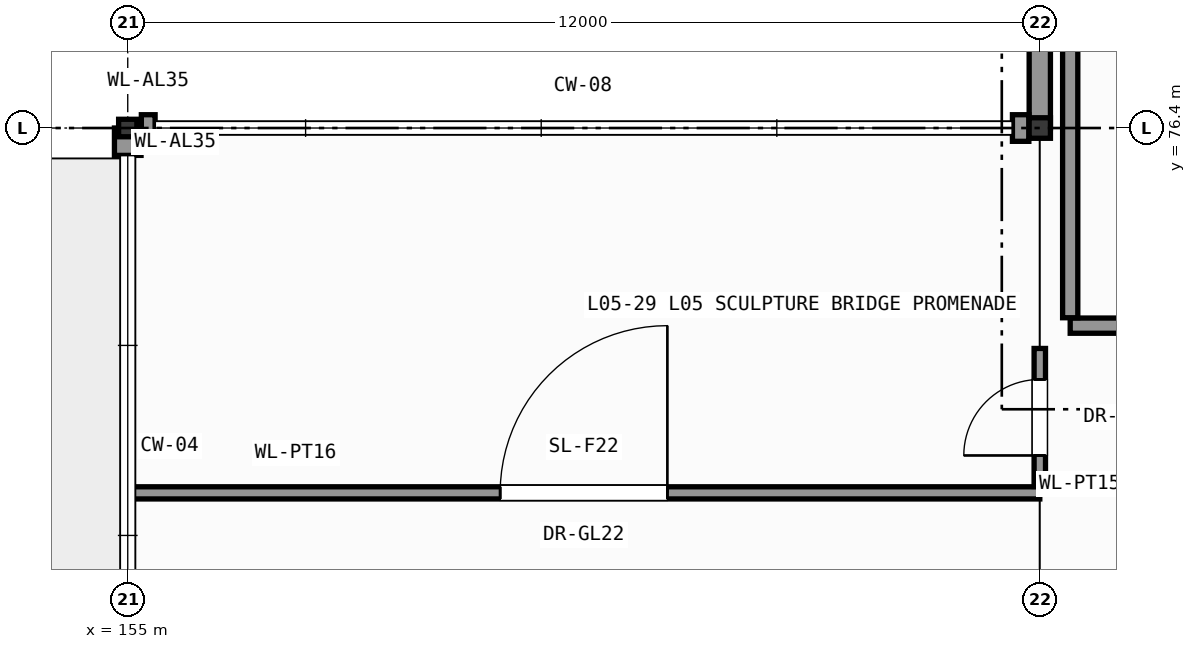
"""IFC4 building model, lengths in metres.
Left out: names, types, materials, properties, quantities, classifications, styles, units other than length and angle.
Written with IfcOpenShell. Run it as: python <this file> out.ifc"""

import sys

from ifc_helpers import new_model, si_unit, direction, frame, frame_2d, origin, origin_2d, place, context, subcontext, project, spatial, rectangle, i_section, extrude, element, fill, save


model = new_model("IFC4")
c1 = context("Model", 3, precision=1e-05, world=origin(), true_north=direction((0.0, 1.0)))
c2 = subcontext(c1, "Body", "Model", "MODEL_VIEW")
j1 = project(units=[si_unit("LENGTHUNIT", "METRE"), si_unit("PLANEANGLEUNIT", "RADIAN")], contexts=[c1])
p1 = place(None, origin())
s1 = spatial("IfcSite", under=j1, at=p1, CompositionType="ELEMENT")
p2 = place(p1, origin())
s2 = spatial("IfcBuilding", under=s1, at=p2, CompositionType="ELEMENT")
p3 = place(p2, frame((0.0, 0.0, 22.2)))
s3 = spatial("IfcBuildingStorey", under=s2, at=p3, CompositionType="ELEMENT", Elevation=22.2)
p4 = place(p3, frame((155.0, 76.4, 0.0), z_axis=(0.0, 0.0, 1.0), x_axis=(1.0, 0.0, 0.0)))
e1 = element("IfcColumn", 1, at=p4, inside=s3, PredefinedType="COLUMN", context=c2, shape_type="SweptSolid", body=[
    extrude(i_section(OverallWidth=0.24, OverallDepth=0.23, WebThickness=0.008, FlangeThickness=0.012, FilletRadius=0.021, at=origin_2d()), origin(), (0.0, 0.0, 1.0), 4.2),
])
p5 = place(p3, frame((167.0, 76.4, 0.0), z_axis=(0.0, 0.0, 1.0), x_axis=(1.0, 0.0, 0.0)))
e2 = element("IfcColumn", 2, at=p5, inside=s3, PredefinedType="COLUMN", context=c2, shape_type="SweptSolid", body=[
    extrude(i_section(OverallWidth=0.28, OverallDepth=0.27, WebThickness=0.008, FlangeThickness=0.013, FilletRadius=0.024, at=origin_2d()), origin(), (0.0, 0.0, 1.0), 4.2),
])
p6 = place(p3, frame((155.0, 76.4, 0.0), z_axis=(0.0, 0.0, 1.0), x_axis=(0.0, -1.0, 0.0)))
e3 = element("IfcWall", 3, at=p6, inside=s3, PredefinedType="SOLIDWALL", context=c2, shape_type="SweptSolid", body=[
    extrude(rectangle(XDim=0.36, YDim=0.35, at=frame_2d((0.18, 0.0))), origin(), (0.0, 0.0, 1.0), 3.485),
])
p7 = place(p3, frame((167.0, 76.4, 0.0), z_axis=(0.0, 0.0, 1.0), x_axis=(0.0, 1.0, 0.0)))
e4 = element("IfcWall", 4, at=p7, inside=s3, PredefinedType="SOLIDWALL", context=c2, shape_type="SweptSolid", body=[
    extrude(rectangle(XDim=7.0, YDim=0.28, at=frame_2d((3.5, 0.0))), origin(), (0.0, 0.0, 1.0), 3.675),
])
p8 = place(p7, frame((1.583, 0.0, 0.95)))
e5 = element("IfcOpeningElement", 5, at=p8, cuts=e4, PredefinedType="OPENING", context=c2, shape_type="SweptSolid", body=[
    extrude(rectangle(XDim=1.5, YDim=2.33, at=frame_2d((0.75, 1.165))), frame((0.0, 0.15, 0.0), z_axis=(0.0, -1.0, 0.0), x_axis=(1.0, 0.0, 0.0)), (0.0, 0.0, 1.0), 0.3),
])
p9 = place(p7, frame((3.917, 0.0, 0.95)))
e6 = element("IfcOpeningElement", 6, at=p9, cuts=e4, PredefinedType="OPENING", context=c2, shape_type="SweptSolid", body=[
    extrude(rectangle(XDim=1.5, YDim=2.33, at=frame_2d((0.75, 1.165))), frame((0.0, 0.15, 0.0), z_axis=(0.0, -1.0, 0.0), x_axis=(1.0, 0.0, 0.0)), (0.0, 0.0, 1.0), 0.3),
])
p10 = place(p3, frame((166.856, 76.4, 0.0), z_axis=(0.0, 0.0, 1.0), x_axis=(-1.0, 0.0, 0.0)))
e7 = element("IfcWall", 7, at=p10, inside=s3, PredefinedType="SOLIDWALL", context=c2, shape_type="SweptSolid", body=[
    extrude(rectangle(XDim=0.216, YDim=0.35, at=frame_2d((0.108, 0.0))), origin(), (0.0, 0.0, 1.0), 3.98),
])
p11 = place(p3, frame((155.36, 76.4, 0.0), z_axis=(0.0, 0.0, 1.0), x_axis=(-1.0, 0.0, 0.0)))
e8 = element("IfcWall", 8, at=p11, inside=s3, PredefinedType="SOLIDWALL", context=c2, shape_type="SweptSolid", body=[
    extrude(rectangle(XDim=0.181, YDim=0.35, at=frame_2d((0.091, 0.0))), origin(), (0.0, 0.0, 1.0), 3.98),
])
p12 = place(p3, frame((167.4, 73.8, 0.0), z_axis=(0.0, 0.0, 1.0), x_axis=(1.0, 0.0, 0.0)))
e9 = element("IfcWall", 9, at=p12, inside=s3, PredefinedType="PARTITIONING", context=c2, shape_type="SweptSolid", body=[
    extrude(rectangle(XDim=6.2, YDim=0.2, at=frame_2d((3.1, 0.0))), origin(), (0.0, 0.0, 1.0), 3.605),
])
p13 = place(p12, frame((2.35, 0.0, 0.0)))
e10 = element("IfcOpeningElement", 10, at=p13, cuts=e9, PredefinedType="OPENING", context=c2, shape_type="SweptSolid", body=[
    extrude(rectangle(XDim=1.5, YDim=2.2, at=frame_2d((0.75, 1.1))), frame((0.0, 0.11, 0.0), z_axis=(0.0, -1.0, 0.0), x_axis=(1.0, 0.0, 0.0)), (0.0, 0.0, 1.0), 0.22),
])
p14 = place(p3, frame((167.4, 73.904, 0.0), z_axis=(0.0, 0.0, 1.0), x_axis=(0.0, 1.0, 0.0)))
e11 = element("IfcWall", 11, at=p14, inside=s3, PredefinedType="PARTITIONING", context=c2, shape_type="SweptSolid", body=[
    extrude(rectangle(XDim=4.296, YDim=0.2, at=frame_2d((2.148, 0.0))), origin(), (0.0, 0.0, 1.0), 3.98),
])
p15 = place(p3, frame((155.0, 71.6, 0.0), z_axis=(0.0, 0.0, 1.0), x_axis=(1.0, 0.0, 0.0)))
e12 = element("IfcWall", 12, at=p15, inside=s3, PredefinedType="PARTITIONING", context=c2, shape_type="SweptSolid", body=[
    extrude(rectangle(XDim=12.0, YDim=0.16, at=frame_2d((6.0, 0.0))), origin(), (0.0, 0.0, 1.0), 3.98),
])
p16 = place(p15, frame((4.9, 0.0, 0.0)))
e13 = element("IfcOpeningElement", 13, at=p16, cuts=e12, PredefinedType="OPENING", context=c2, shape_type="SweptSolid", body=[
    extrude(rectangle(XDim=2.2, YDim=2.6, at=frame_2d((1.1, 1.3))), frame((0.0, 0.09, 0.0), z_axis=(0.0, -1.0, 0.0), x_axis=(1.0, 0.0, 0.0)), (0.0, 0.0, 1.0), 0.18),
])
p17 = place(p3, frame((167.0, 71.684, 0.0), z_axis=(0.0, 0.0, 1.0), x_axis=(0.0, 1.0, 0.0)))
e14 = element("IfcWall", 14, at=p17, inside=s3, PredefinedType="PARTITIONING", context=c2, shape_type="SweptSolid", body=[
    extrude(rectangle(XDim=1.816, YDim=0.15, at=frame_2d((0.908, 0.0))), origin(), (0.0, 0.0, 1.0), 3.525),
])
p18 = place(p17, frame((0.408, 0.0, 0.0)))
e15 = element("IfcOpeningElement", 15, at=p18, cuts=e14, PredefinedType="OPENING", context=c2, shape_type="SweptSolid", body=[
    extrude(rectangle(XDim=1.0, YDim=2.15, at=frame_2d((0.5, 1.075))), frame((0.0, 0.085, 0.0), z_axis=(0.0, -1.0, 0.0), x_axis=(1.0, 0.0, 0.0)), (0.0, 0.0, 1.0), 0.17),
])
p19 = place(p16, origin())
e16 = element("IfcDoor", 16, at=p19, inside=s3, OperationType="SINGLE_SWING_RIGHT", PredefinedType="DOOR", context=c2, shape_type="SweptSolid", body=[
    extrude(rectangle(XDim=2.2, YDim=2.6, at=frame_2d((1.1, 1.3))), frame((0.0, 0.025, 0.0), z_axis=(0.0, -1.0, 0.0), x_axis=(1.0, 0.0, 0.0)), (0.0, 0.0, 1.0), 0.05),
])
fill(e13, e16)
p20 = place(p18, origin())
e17 = element("IfcDoor", 17, at=p20, inside=s3, OperationType="SINGLE_SWING_LEFT", PredefinedType="DOOR", context=c2, shape_type="SweptSolid", body=[
    extrude(rectangle(XDim=1.0, YDim=2.15, at=frame_2d((0.5, 1.075))), frame((0.0, 0.025, 0.0), z_axis=(0.0, -1.0, 0.0), x_axis=(1.0, 0.0, 0.0)), (0.0, 0.0, 1.0), 0.05),
])
fill(e15, e17)
save(model, sys.argv[1])
